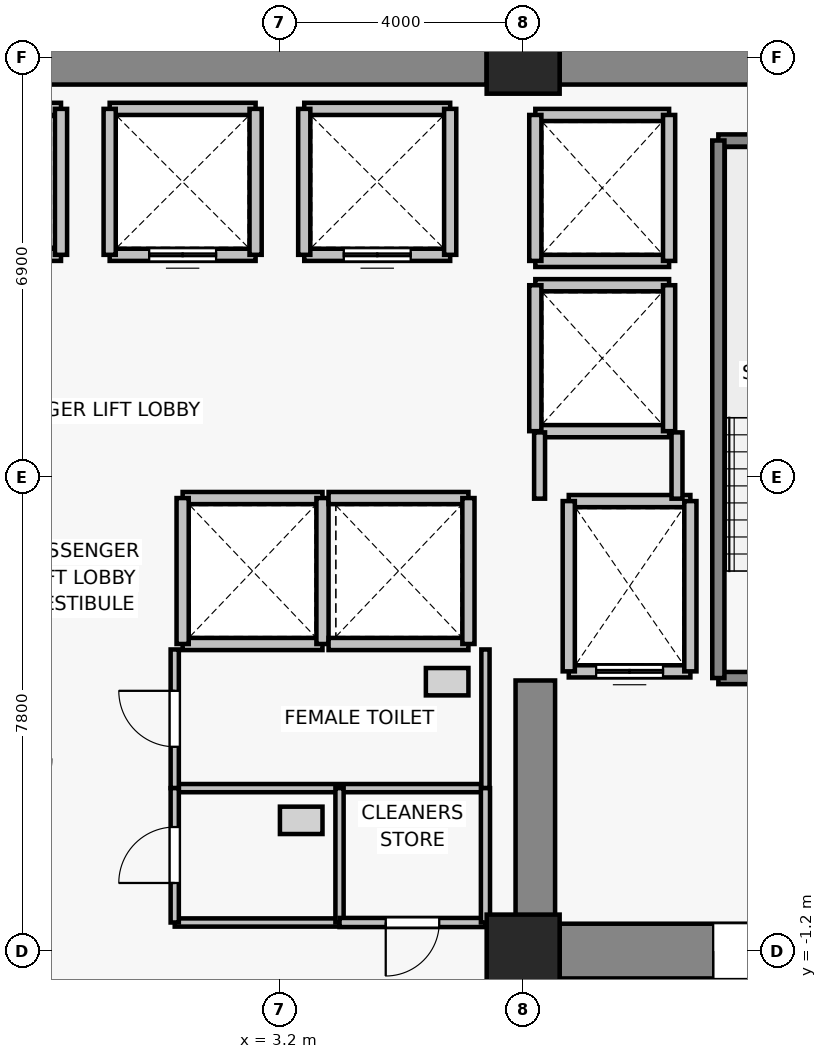
"""IFC4 building model, lengths in metres.
Left out: names, types, materials, properties, quantities, classifications, styles, units other than length and angle.
Written with IfcOpenShell. Run it as: python <this file> out.ifc"""

import sys

from ifc_helpers import new_model, si_unit, direction, frame, frame_2d, origin, origin_2d, place, context, subcontext, project, spatial, rectangle, extrude, source, transform, mapped, element, fill, save


model = new_model("IFC4")
c1 = context("Model", 3, precision=1e-05, world=origin(), true_north=direction((0.0, 1.0)))
c2 = subcontext(c1, "Body", "Model", "MODEL_VIEW")
j1 = project(units=[si_unit("LENGTHUNIT", "METRE"), si_unit("PLANEANGLEUNIT", "RADIAN")], contexts=[c1])
p1 = place(None, origin())
s1 = spatial("IfcSite", under=j1, at=p1, CompositionType="ELEMENT")
p2 = place(p1, origin())
s2 = spatial("IfcBuilding", under=s1, at=p2, CompositionType="ELEMENT")
p3 = place(p2, frame((0.0, 0.0, 73.6)))
s3 = spatial("IfcBuildingStorey", under=s2, at=p3, CompositionType="ELEMENT", Elevation=73.6)
for number, where, z_axis, x_axis in (
    (1, (7.2, -1.2, 0.0), (0.0, 0.0, 1.0), (1.0, 0.0, 0.0)),
    (2, (7.2, 13.5, 0.0), (0.0, 0.0, 1.0), (1.0, 0.0, 0.0)),
):
    element("IfcColumn", number, at=place(p3, frame(where, z_axis=z_axis, x_axis=x_axis)), inside=s3, PredefinedType="COLUMN", context=c2, shape_type="SweptSolid", body=[
        extrude(rectangle(XDim=1.2, YDim=1.2, at=origin_2d()), origin(), (0.0, 0.0, 1.0), 3.3),
    ])
p4 = place(p3, frame((-6.6, 13.5, 0.0), z_axis=(0.0, 0.0, 1.0), x_axis=(1.0, 0.0, 0.0)))
e3 = element("IfcWall", 3, at=p4, inside=s3, PredefinedType="SHEAR", context=c2, shape_type="SweptSolid", body=[
    extrude(rectangle(XDim=13.2, YDim=0.9, at=frame_2d((6.6, 0.0))), origin(), (0.0, 0.0, 1.0), 3.075),
])
p5 = place(p3, frame((7.8, 13.5, 0.0), z_axis=(0.0, 0.0, 1.0), x_axis=(1.0, 0.0, 0.0)))
e4 = element("IfcWall", 4, at=p5, inside=s3, PredefinedType="SHEAR", context=c2, shape_type="SweptSolid", body=[
    extrude(rectangle(XDim=6.0, YDim=0.9, at=frame_2d((3.0, 0.0))), origin(), (0.0, 0.0, 1.0), 3.075),
])
p6 = place(p3, frame((13.8, -1.2, 0.0), z_axis=(0.0, 0.0, 1.0), x_axis=(-1.0, 0.0, 0.0)))
e5 = element("IfcWall", 5, at=p6, inside=s3, PredefinedType="SHEAR", context=c2, shape_type="SweptSolid", body=[
    extrude(rectangle(XDim=6.0, YDim=0.9, at=frame_2d((3.0, 0.0))), origin(), (0.0, 0.0, 1.0), 3.075),
])
p7 = place(p6, frame((2.325, 0.0, 0.0)))
e6 = element("IfcOpeningElement", 6, at=p7, cuts=e5, PredefinedType="OPENING", context=c2, shape_type="SweptSolid", body=[
    extrude(rectangle(XDim=1.15, YDim=2.15, at=frame_2d((0.575, 1.075))), frame((0.0, 0.46, 0.0), z_axis=(0.0, -1.0, 0.0), x_axis=(1.0, 0.0, 0.0)), (0.0, 0.0, 1.0), 0.92),
])
p8 = place(p3, frame((7.4, -0.75, 0.0), z_axis=(0.0, 0.0, 1.0), x_axis=(0.0, 1.0, 0.0)))
e7 = element("IfcWall", 7, at=p8, inside=s3, PredefinedType="SHEAR", context=c2, shape_type="SweptSolid", body=[
    extrude(rectangle(XDim=4.0, YDim=0.65, at=frame_2d((2.0, 0.0))), origin(), (0.0, 0.0, 1.0), 3.075),
])
p9 = place(p3, frame((9.95, 3.4, 0.0), z_axis=(0.0, 0.0, 1.0), x_axis=(-1.0, 0.0, 0.0)))
e8 = element("IfcWall", 8, at=p9, inside=s3, PredefinedType="SOLIDWALL", context=c2, shape_type="SweptSolid", body=[
    extrude(rectangle(XDim=2.0, YDim=0.2, at=frame_2d((1.0, 0.0))), origin(), (0.0, 0.0, 1.0), 3.075),
])
p10 = place(p9, frame((0.45, 0.0, 0.0)))
e9 = element("IfcOpeningElement", 9, at=p10, cuts=e8, PredefinedType="OPENING", context=c2, shape_type="SweptSolid", body=[
    extrude(rectangle(XDim=1.1, YDim=2.2, at=frame_2d((0.55, 1.1))), frame((0.0, 0.11, 0.0), z_axis=(0.0, -1.0, 0.0), x_axis=(1.0, 0.0, 0.0)), (0.0, 0.0, 1.0), 0.22),
])
p11 = place(p3, frame((7.95, 6.2, 0.0), z_axis=(0.0, 0.0, 1.0), x_axis=(1.0, 0.0, 0.0)))
e10 = element("IfcWall", 10, at=p11, inside=s3, PredefinedType="SOLIDWALL", context=c2, shape_type="SweptSolid", body=[
    extrude(rectangle(XDim=2.0, YDim=0.2, at=frame_2d((1.0, 0.0))), origin(), (0.0, 0.0, 1.0), 3.075),
])
for number, where, z_axis, x_axis in (
    (11, (7.95, 3.4, 0.0), (0.0, 0.0, 1.0), (0.0, 1.0, 0.0)),
    (12, (9.95, 6.2, 0.0), (0.0, 0.0, 1.0), (0.0, -1.0, 0.0)),
):
    element("IfcWall", number, at=place(p3, frame(where, z_axis=z_axis, x_axis=x_axis)), inside=s3, PredefinedType="SOLIDWALL", context=c2, shape_type="SweptSolid", body=[
        extrude(rectangle(XDim=2.8, YDim=0.2, at=frame_2d((1.4, 0.0))), origin(), (0.0, 0.0, 1.0), 3.075),
    ])
p12 = place(p3, frame((-0.4, 10.25, 0.0), z_axis=(0.0, 0.0, 1.0), x_axis=(-1.0, 0.0, 0.0)))
e13 = element("IfcWall", 13, at=p12, inside=s3, PredefinedType="SOLIDWALL", context=c2, shape_type="SweptSolid", body=[
    extrude(rectangle(XDim=2.4, YDim=0.2, at=frame_2d((1.2, 0.0))), origin(), (0.0, 0.0, 1.0), 3.075),
])
p13 = place(p12, frame((0.65, 0.0, 0.0)))
e14 = element("IfcOpeningElement", 14, at=p13, cuts=e13, PredefinedType="OPENING", context=c2, shape_type="SweptSolid", body=[
    extrude(rectangle(XDim=1.1, YDim=2.2, at=frame_2d((0.55, 1.1))), frame((0.0, 0.11, 0.0), z_axis=(0.0, -1.0, 0.0), x_axis=(1.0, 0.0, 0.0)), (0.0, 0.0, 1.0), 0.22),
])
p14 = place(p3, frame((-2.8, 12.65, 0.0), z_axis=(0.0, 0.0, 1.0), x_axis=(1.0, 0.0, 0.0)))
e15 = element("IfcWall", 15, at=p14, inside=s3, PredefinedType="SOLIDWALL", context=c2, shape_type="SweptSolid", body=[
    extrude(rectangle(XDim=2.4, YDim=0.2, at=frame_2d((1.2, 0.0))), origin(), (0.0, 0.0, 1.0), 3.075),
])
p15 = place(p3, frame((-0.4, 12.65, 0.0), z_axis=(0.0, 0.0, 1.0), x_axis=(0.0, -1.0, 0.0)))
e16 = element("IfcWall", 16, at=p15, inside=s3, PredefinedType="SOLIDWALL", context=c2, shape_type="SweptSolid", body=[
    extrude(rectangle(XDim=2.4, YDim=0.2, at=frame_2d((1.2, 0.0))), origin(), (0.0, 0.0, 1.0), 3.075),
])
p16 = place(p3, frame((2.8, 10.25, 0.0), z_axis=(0.0, 0.0, 1.0), x_axis=(-1.0, 0.0, 0.0)))
e17 = element("IfcWall", 17, at=p16, inside=s3, PredefinedType="SOLIDWALL", context=c2, shape_type="SweptSolid", body=[
    extrude(rectangle(XDim=2.4, YDim=0.2, at=frame_2d((1.2, 0.0))), origin(), (0.0, 0.0, 1.0), 3.075),
])
p17 = place(p16, frame((0.65, 0.0, 0.0)))
e18 = element("IfcOpeningElement", 18, at=p17, cuts=e17, PredefinedType="OPENING", context=c2, shape_type="SweptSolid", body=[
    extrude(rectangle(XDim=1.1, YDim=2.2, at=frame_2d((0.55, 1.1))), frame((0.0, 0.11, 0.0), z_axis=(0.0, -1.0, 0.0), x_axis=(1.0, 0.0, 0.0)), (0.0, 0.0, 1.0), 0.22),
])
p18 = place(p3, frame((0.4, 12.65, 0.0), z_axis=(0.0, 0.0, 1.0), x_axis=(1.0, 0.0, 0.0)))
e19 = element("IfcWall", 19, at=p18, inside=s3, PredefinedType="SOLIDWALL", context=c2, shape_type="SweptSolid", body=[
    extrude(rectangle(XDim=2.4, YDim=0.2, at=frame_2d((1.2, 0.0))), origin(), (0.0, 0.0, 1.0), 3.075),
])
for number, where, z_axis, x_axis in (
    (20, (0.4, 10.25, 0.0), (0.0, 0.0, 1.0), (0.0, 1.0, 0.0)),
    (21, (2.8, 12.65, 0.0), (0.0, 0.0, 1.0), (0.0, -1.0, 0.0)),
):
    element("IfcWall", number, at=place(p3, frame(where, z_axis=z_axis, x_axis=x_axis)), inside=s3, PredefinedType="SOLIDWALL", context=c2, shape_type="SweptSolid", body=[
        extrude(rectangle(XDim=2.4, YDim=0.2, at=frame_2d((1.2, 0.0))), origin(), (0.0, 0.0, 1.0), 3.075),
    ])
p19 = place(p3, frame((6.0, 10.25, 0.0), z_axis=(0.0, 0.0, 1.0), x_axis=(-1.0, 0.0, 0.0)))
e22 = element("IfcWall", 22, at=p19, inside=s3, PredefinedType="SOLIDWALL", context=c2, shape_type="SweptSolid", body=[
    extrude(rectangle(XDim=2.4, YDim=0.2, at=frame_2d((1.2, 0.0))), origin(), (0.0, 0.0, 1.0), 3.075),
])
p20 = place(p19, frame((0.65, 0.0, 0.0)))
e23 = element("IfcOpeningElement", 23, at=p20, cuts=e22, PredefinedType="OPENING", context=c2, shape_type="SweptSolid", body=[
    extrude(rectangle(XDim=1.1, YDim=2.2, at=frame_2d((0.55, 1.1))), frame((0.0, 0.11, 0.0), z_axis=(0.0, -1.0, 0.0), x_axis=(1.0, 0.0, 0.0)), (0.0, 0.0, 1.0), 0.22),
])
for number, where, z_axis, x_axis in (
    (24, (3.6, 12.65, 0.0), (0.0, 0.0, 1.0), (1.0, 0.0, 0.0)),
    (25, (3.6, 10.25, 0.0), (0.0, 0.0, 1.0), (0.0, 1.0, 0.0)),
    (26, (6.0, 12.65, 0.0), (0.0, 0.0, 1.0), (0.0, -1.0, 0.0)),
):
    element("IfcWall", number, at=place(p3, frame(where, z_axis=z_axis, x_axis=x_axis)), inside=s3, PredefinedType="SOLIDWALL", context=c2, shape_type="SweptSolid", body=[
        extrude(rectangle(XDim=2.4, YDim=0.2, at=frame_2d((1.2, 0.0))), origin(), (0.0, 0.0, 1.0), 3.075),
    ])
for number, where, z_axis, x_axis in (
    (27, (3.9, 3.85, 0.0), (0.0, 0.0, 1.0), (-1.0, 0.0, 0.0)),
    (28, (1.6, 6.25, 0.0), (0.0, 0.0, 1.0), (1.0, 0.0, 0.0)),
):
    element("IfcWall", number, at=place(p3, frame(where, z_axis=z_axis, x_axis=x_axis)), inside=s3, PredefinedType="SOLIDWALL", context=c2, shape_type="SweptSolid", body=[
        extrude(rectangle(XDim=2.3, YDim=0.2, at=frame_2d((1.15, 0.0))), origin(), (0.0, 0.0, 1.0), 3.075),
    ])
for number, where, z_axis, x_axis in (
    (29, (1.6, 3.85, 0.0), (0.0, 0.0, 1.0), (0.0, 1.0, 0.0)),
    (30, (3.9, 6.25, 0.0), (0.0, 0.0, 1.0), (0.0, -1.0, 0.0)),
):
    element("IfcWall", number, at=place(p3, frame(where, z_axis=z_axis, x_axis=x_axis)), inside=s3, PredefinedType="SOLIDWALL", context=c2, shape_type="SweptSolid", body=[
        extrude(rectangle(XDim=2.4, YDim=0.2, at=frame_2d((1.2, 0.0))), origin(), (0.0, 0.0, 1.0), 3.075),
    ])
for number, where, z_axis, x_axis in (
    (31, (6.3, 3.85, 0.0), (0.0, 0.0, 1.0), (-1.0, 0.0, 0.0)),
    (32, (4.0, 6.25, 0.0), (0.0, 0.0, 1.0), (1.0, 0.0, 0.0)),
):
    element("IfcWall", number, at=place(p3, frame(where, z_axis=z_axis, x_axis=x_axis)), inside=s3, PredefinedType="SOLIDWALL", context=c2, shape_type="SweptSolid", body=[
        extrude(rectangle(XDim=2.3, YDim=0.2, at=frame_2d((1.15, 0.0))), origin(), (0.0, 0.0, 1.0), 3.075),
    ])
p21 = place(p3, frame((6.3, 6.25, 0.0), z_axis=(0.0, 0.0, 1.0), x_axis=(0.0, -1.0, 0.0)))
e33 = element("IfcWall", 33, at=p21, inside=s3, PredefinedType="SOLIDWALL", context=c2, shape_type="SweptSolid", body=[
    extrude(rectangle(XDim=2.4, YDim=0.2, at=frame_2d((1.2, 0.0))), origin(), (0.0, 0.0, 1.0), 3.075),
])
for number, where, z_axis, x_axis in (
    (34, (9.6, 7.35, 0.0), (0.0, 0.0, 1.0), (-1.0, 0.0, 0.0)),
    (35, (7.4, 9.75, 0.0), (0.0, 0.0, 1.0), (1.0, 0.0, 0.0)),
):
    element("IfcWall", number, at=place(p3, frame(where, z_axis=z_axis, x_axis=x_axis)), inside=s3, PredefinedType="SOLIDWALL", context=c2, shape_type="SweptSolid", body=[
        extrude(rectangle(XDim=2.2, YDim=0.2, at=frame_2d((1.1, 0.0))), origin(), (0.0, 0.0, 1.0), 2.465),
    ])
p22 = place(p3, frame((7.4, 7.35, 0.0), z_axis=(0.0, 0.0, 1.0), x_axis=(0.0, 1.0, 0.0)))
e36 = element("IfcWall", 36, at=p22, inside=s3, PredefinedType="SOLIDWALL", context=c2, shape_type="SweptSolid", body=[
    extrude(rectangle(XDim=2.4, YDim=0.2, at=frame_2d((1.2, 0.0))), origin(), (0.0, 0.0, 1.0), 2.465),
])
p23 = place(p3, frame((9.6, 9.75, 0.0), z_axis=(0.0, 0.0, 1.0), x_axis=(0.0, -1.0, 0.0)))
e37 = element("IfcWall", 37, at=p23, inside=s3, PredefinedType="SOLIDWALL", context=c2, shape_type="SweptSolid", body=[
    extrude(rectangle(XDim=2.4, YDim=0.2, at=frame_2d((1.2, 0.0))), origin(), (0.0, 0.0, 1.0), 3.075),
])
for number, where, z_axis, x_axis in (
    (38, (9.6, 10.15, 0.0), (0.0, 0.0, 1.0), (-1.0, 0.0, 0.0)),
    (39, (7.4, 12.55, 0.0), (0.0, 0.0, 1.0), (1.0, 0.0, 0.0)),
):
    element("IfcWall", number, at=place(p3, frame(where, z_axis=z_axis, x_axis=x_axis)), inside=s3, PredefinedType="SOLIDWALL", context=c2, shape_type="SweptSolid", body=[
        extrude(rectangle(XDim=2.2, YDim=0.2, at=frame_2d((1.1, 0.0))), origin(), (0.0, 0.0, 1.0), 2.465),
    ])
p24 = place(p3, frame((7.4, 10.15, 0.0), z_axis=(0.0, 0.0, 1.0), x_axis=(0.0, 1.0, 0.0)))
e40 = element("IfcWall", 40, at=p24, inside=s3, PredefinedType="SOLIDWALL", context=c2, shape_type="SweptSolid", body=[
    extrude(rectangle(XDim=2.4, YDim=0.2, at=frame_2d((1.2, 0.0))), origin(), (0.0, 0.0, 1.0), 2.465),
])
p25 = place(p3, frame((9.6, 12.55, 0.0), z_axis=(0.0, 0.0, 1.0), x_axis=(0.0, -1.0, 0.0)))
e41 = element("IfcWall", 41, at=p25, inside=s3, PredefinedType="SOLIDWALL", context=c2, shape_type="SweptSolid", body=[
    extrude(rectangle(XDim=2.4, YDim=0.2, at=frame_2d((1.2, 0.0))), origin(), (0.0, 0.0, 1.0), 3.075),
])
p26 = place(p3, frame((13.93, 3.29, 0.0), z_axis=(0.0, 0.0, 1.0), x_axis=(-1.0, 0.0, 0.0)))
e42 = element("IfcWall", 42, at=p26, inside=s3, PredefinedType="SOLIDWALL", context=c2, shape_type="SweptSolid", body=[
    extrude(rectangle(XDim=3.52, YDim=0.2, at=frame_2d((1.76, 0.0))), origin(), (0.0, 0.0, 1.0), 3.075),
])
p27 = place(p26, frame((1.205, 0.0, 0.0)))
e43 = element("IfcOpeningElement", 43, at=p27, cuts=e42, PredefinedType="OPENING", context=c2, shape_type="SweptSolid", body=[
    extrude(rectangle(XDim=1.15, YDim=2.15, at=frame_2d((0.575, 1.075))), frame((0.0, 0.11, 0.0), z_axis=(0.0, -1.0, 0.0), x_axis=(1.0, 0.0, 0.0)), (0.0, 0.0, 1.0), 0.22),
])
p28 = place(p3, frame((10.41, 12.13, 0.0), z_axis=(0.0, 0.0, 1.0), x_axis=(1.0, 0.0, 0.0)))
e44 = element("IfcWall", 44, at=p28, inside=s3, PredefinedType="SOLIDWALL", context=c2, shape_type="SweptSolid", body=[
    extrude(rectangle(XDim=3.52, YDim=0.2, at=frame_2d((1.76, 0.0))), origin(), (0.0, 0.0, 1.0), 3.075),
])
p29 = place(p3, frame((10.41, 3.29, 0.0), z_axis=(0.0, 0.0, 1.0), x_axis=(0.0, 1.0, 0.0)))
e45 = element("IfcWall", 45, at=p29, inside=s3, PredefinedType="SOLIDWALL", context=c2, shape_type="SweptSolid", body=[
    extrude(rectangle(XDim=8.84, YDim=0.2, at=frame_2d((4.42, 0.0))), origin(), (0.0, 0.0, 1.0), 3.075),
])
p30 = place(p3, frame((7.47, 6.24, 0.0), z_axis=(0.0, 0.0, 1.0), x_axis=(0.0, 1.0, 0.0)))
e46 = element("IfcWall", 46, at=p30, inside=s3, PredefinedType="PARTITIONING", context=c2, shape_type="SweptSolid", body=[
    extrude(rectangle(XDim=1.09, YDim=0.18, at=frame_2d((0.545, 0.0))), origin(), (0.0, 0.0, 1.0), 2.465),
])
p31 = place(p3, frame((9.73, 7.33, 0.0), z_axis=(0.0, 0.0, 1.0), x_axis=(0.0, -1.0, 0.0)))
e47 = element("IfcWall", 47, at=p31, inside=s3, PredefinedType="PARTITIONING", context=c2, shape_type="SweptSolid", body=[
    extrude(rectangle(XDim=1.09, YDim=0.18, at=frame_2d((0.545, 0.0))), origin(), (0.0, 0.0, 1.0), 3.075),
])
p32 = place(p3, frame((6.58, 1.48, 0.0), z_axis=(0.0, 0.0, 1.0), x_axis=(-1.0, 0.0, 0.0)))
e48 = element("IfcWall", 48, at=p32, inside=s3, PredefinedType="PARTITIONING", context=c2, shape_type="SweptSolid", body=[
    extrude(rectangle(XDim=5.11, YDim=0.135, at=frame_2d((2.555, 0.0))), origin(), (0.0, 0.0, 1.0), 3.075),
])
p33 = place(p3, frame((1.47, 1.48, 0.0), z_axis=(0.0, 0.0, 1.0), x_axis=(0.0, 1.0, 0.0)))
e49 = element("IfcWall", 49, at=p33, inside=s3, PredefinedType="PARTITIONING", context=c2, shape_type="SweptSolid", body=[
    extrude(rectangle(XDim=2.28, YDim=0.135, at=frame_2d((1.14, 0.0))), origin(), (0.0, 0.0, 1.0), 3.075),
])
p34 = place(p33, frame((0.68, 0.0, 0.0)))
e50 = element("IfcOpeningElement", 50, at=p34, cuts=e49, PredefinedType="OPENING", context=c2, shape_type="SweptSolid", body=[
    extrude(rectangle(XDim=0.92, YDim=2.1, at=frame_2d((0.46, 1.05))), frame((0.0, 0.077, 0.0), z_axis=(0.0, -1.0, 0.0), x_axis=(1.0, 0.0, 0.0)), (0.0, 0.0, 1.0), 0.155),
])
p35 = place(p3, frame((6.58, 3.76, 0.0), z_axis=(0.0, 0.0, 1.0), x_axis=(0.0, -1.0, 0.0)))
e51 = element("IfcWall", 51, at=p35, inside=s3, PredefinedType="PARTITIONING", context=c2, shape_type="SweptSolid", body=[
    extrude(rectangle(XDim=2.28, YDim=0.135, at=frame_2d((1.14, 0.0))), origin(), (0.0, 0.0, 1.0), 3.075),
])
p36 = place(p3, frame((4.18, -0.73, 0.0), z_axis=(0.0, 0.0, 1.0), x_axis=(-1.0, 0.0, 0.0)))
e52 = element("IfcWall", 52, at=p36, inside=s3, PredefinedType="PARTITIONING", context=c2, shape_type="SweptSolid", body=[
    extrude(rectangle(XDim=2.71, YDim=0.135, at=frame_2d((1.355, 0.0))), origin(), (0.0, 0.0, 1.0), 3.075),
])
p37 = place(p3, frame((1.47, -0.73, 0.0), z_axis=(0.0, 0.0, 1.0), x_axis=(0.0, 1.0, 0.0)))
e53 = element("IfcWall", 53, at=p37, inside=s3, PredefinedType="PARTITIONING", context=c2, shape_type="SweptSolid", body=[
    extrude(rectangle(XDim=2.21, YDim=0.135, at=frame_2d((1.105, 0.0))), origin(), (0.0, 0.0, 1.0), 3.075),
])
p38 = place(p37, frame((0.65, 0.0, 0.0)))
e54 = element("IfcOpeningElement", 54, at=p38, cuts=e53, PredefinedType="OPENING", context=c2, shape_type="SweptSolid", body=[
    extrude(rectangle(XDim=0.92, YDim=2.1, at=frame_2d((0.46, 1.05))), frame((0.0, 0.077, 0.0), z_axis=(0.0, -1.0, 0.0), x_axis=(1.0, 0.0, 0.0)), (0.0, 0.0, 1.0), 0.155),
])
p39 = place(p3, frame((4.18, 1.48, 0.0), z_axis=(0.0, 0.0, 1.0), x_axis=(0.0, -1.0, 0.0)))
e55 = element("IfcWall", 55, at=p39, inside=s3, PredefinedType="PARTITIONING", context=c2, shape_type="SweptSolid", body=[
    extrude(rectangle(XDim=2.21, YDim=0.135, at=frame_2d((1.105, 0.0))), origin(), (0.0, 0.0, 1.0), 3.075),
])
p40 = place(p3, frame((6.58, -0.73, 0.0), z_axis=(0.0, 0.0, 1.0), x_axis=(-1.0, 0.0, 0.0)))
e56 = element("IfcWall", 56, at=p40, inside=s3, PredefinedType="PARTITIONING", context=c2, shape_type="SweptSolid", body=[
    extrude(rectangle(XDim=2.4, YDim=0.15, at=frame_2d((1.2, 0.0))), origin(), (0.0, 0.0, 1.0), 3.075),
])
p41 = place(p40, frame((0.76, 0.0, 0.0)))
e57 = element("IfcOpeningElement", 57, at=p41, cuts=e56, PredefinedType="OPENING", context=c2, shape_type="SweptSolid", body=[
    extrude(rectangle(XDim=0.88, YDim=2.1, at=frame_2d((0.44, 1.05))), frame((0.0, 0.085, 0.0), z_axis=(0.0, -1.0, 0.0), x_axis=(1.0, 0.0, 0.0)), (0.0, 0.0, 1.0), 0.17),
])
p42 = place(p3, frame((6.58, 1.48, 0.0), z_axis=(0.0, 0.0, 1.0), x_axis=(0.0, -1.0, 0.0)))
e58 = element("IfcWall", 58, at=p42, inside=s3, PredefinedType="PARTITIONING", context=c2, shape_type="SweptSolid", body=[
    extrude(rectangle(XDim=2.21, YDim=0.15, at=frame_2d((1.105, 0.0))), origin(), (0.0, 0.0, 1.0), 3.075),
])
m1 = source(origin(), c2, "Body", "SweptSolid", [
    extrude(rectangle(XDim=1.1, YDim=2.2, at=frame_2d((0.55, 1.1))), frame((0.0, 0.025, 0.0), z_axis=(0.0, -1.0, 0.0), x_axis=(1.0, 0.0, 0.0)), (0.0, 0.0, 1.0), 0.05),
])
p43 = place(p10, origin())
e59 = element("IfcDoor", 59, at=p43, inside=s3, OperationType="DOUBLE_DOOR_SLIDING", PredefinedType="DOOR", context=c2, shape_type="MappedRepresentation", body=[
    mapped(m1, transform((0.0, 0.0, 0.0), x_axis=(1.0, 0.0, 0.0), y_axis=(0.0, 1.0, 0.0), z_axis=(0.0, 0.0, 1.0), scale=1.0)),
])
fill(e9, e59)
p44 = place(p17, origin())
e60 = element("IfcDoor", 60, at=p44, inside=s3, OperationType="DOUBLE_DOOR_SLIDING", PredefinedType="DOOR", context=c2, shape_type="MappedRepresentation", body=[
    mapped(m1, transform((0.0, 0.0, 0.0), x_axis=(1.0, 0.0, 0.0), y_axis=(0.0, 1.0, 0.0), z_axis=(0.0, 0.0, 1.0), scale=1.0)),
])
fill(e18, e60)
p45 = place(p20, origin())
e61 = element("IfcDoor", 61, at=p45, inside=s3, OperationType="DOUBLE_DOOR_SLIDING", PredefinedType="DOOR", context=c2, shape_type="MappedRepresentation", body=[
    mapped(m1, transform((0.0, 0.0, 0.0), x_axis=(1.0, 0.0, 0.0), y_axis=(0.0, 1.0, 0.0), z_axis=(0.0, 0.0, 1.0), scale=1.0)),
])
fill(e23, e61)
m2 = source(origin(), c2, "Body", "SweptSolid", [
    extrude(rectangle(XDim=1.15, YDim=2.15, at=frame_2d((0.575, 1.075))), frame((0.0, 0.025, 0.0), z_axis=(0.0, -1.0, 0.0), x_axis=(1.0, 0.0, 0.0)), (0.0, 0.0, 1.0), 0.05),
])
p46 = place(p7, origin())
e62 = element("IfcDoor", 62, at=p46, inside=s3, OperationType="SINGLE_SWING_RIGHT", PredefinedType="DOOR", context=c2, shape_type="MappedRepresentation", body=[
    mapped(m2, transform((0.0, 0.0, 0.0), x_axis=(1.0, 0.0, 0.0), y_axis=(0.0, 1.0, 0.0), z_axis=(0.0, 0.0, 1.0), scale=1.0)),
])
fill(e6, e62)
m3 = source(origin(), c2, "Body", "SweptSolid", [
    extrude(rectangle(XDim=0.92, YDim=2.1, at=frame_2d((0.46, 1.05))), frame((0.0, 0.025, 0.0), z_axis=(0.0, -1.0, 0.0), x_axis=(1.0, 0.0, 0.0)), (0.0, 0.0, 1.0), 0.05),
])
p47 = place(p34, origin())
e63 = element("IfcDoor", 63, at=p47, inside=s3, OperationType="SINGLE_SWING_RIGHT", PredefinedType="DOOR", context=c2, shape_type="MappedRepresentation", body=[
    mapped(m3, transform((0.0, 0.0, 0.0), x_axis=(1.0, 0.0, 0.0), y_axis=(0.0, 1.0, 0.0), z_axis=(0.0, 0.0, 1.0), scale=1.0)),
])
fill(e50, e63)
p48 = place(p38, origin())
e64 = element("IfcDoor", 64, at=p48, inside=s3, OperationType="SINGLE_SWING_LEFT", PredefinedType="DOOR", context=c2, shape_type="MappedRepresentation", body=[
    mapped(m3, transform((0.0, 0.0, 0.0), x_axis=(1.0, 0.0, 0.0), y_axis=(0.0, 1.0, 0.0), z_axis=(0.0, 0.0, 1.0), scale=1.0)),
])
fill(e54, e64)
m4 = source(origin(), c2, "Body", "SweptSolid", [
    extrude(rectangle(XDim=0.88, YDim=2.1, at=frame_2d((0.44, 1.05))), frame((0.0, 0.025, 0.0), z_axis=(0.0, -1.0, 0.0), x_axis=(1.0, 0.0, 0.0)), (0.0, 0.0, 1.0), 0.05),
])
p49 = place(p41, origin())
e65 = element("IfcDoor", 65, at=p49, inside=s3, OperationType="SINGLE_SWING_RIGHT", PredefinedType="DOOR", context=c2, shape_type="MappedRepresentation", body=[
    mapped(m4, transform((0.0, 0.0, 0.0), x_axis=(1.0, 0.0, 0.0), y_axis=(0.0, 1.0, 0.0), z_axis=(0.0, 0.0, 1.0), scale=1.0)),
])
fill(e57, e65)
save(model, sys.argv[1])
